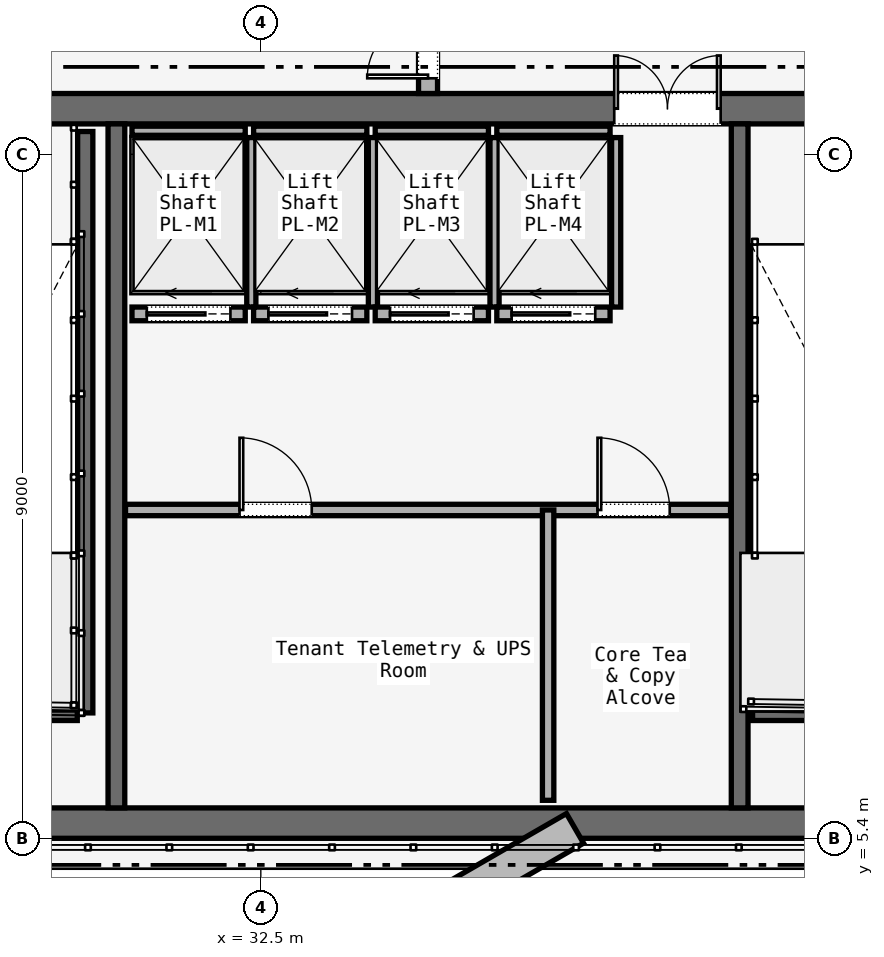
"""IFC4 building model, lengths in metres.
Left out: names, types, materials, properties, quantities, classifications, styles, units other than length and angle.
Written with IfcOpenShell. Run it as: python <this file> out.ifc"""

import sys

from ifc_helpers import new_model, si_unit, direction, frame, frame_2d, origin, place, context, subcontext, project, spatial, rectangle, extrude, element, fill, save


model = new_model("IFC4")
c1 = context("Model", 3, precision=1e-05, world=origin(), true_north=direction((0.0, 1.0)))
c2 = subcontext(c1, "Body", "Model", "MODEL_VIEW")
j1 = project(units=[si_unit("LENGTHUNIT", "METRE"), si_unit("PLANEANGLEUNIT", "RADIAN")], contexts=[c1])
p1 = place(None, origin())
s1 = spatial("IfcSite", under=j1, at=p1, CompositionType="ELEMENT")
p2 = place(p1, origin())
s2 = spatial("IfcBuilding", under=s1, at=p2, CompositionType="ELEMENT")
p3 = place(p2, frame((0.0, 0.0, 203.0)))
s3 = spatial("IfcBuildingStorey", under=s2, at=p3, CompositionType="ELEMENT", Elevation=203.0)
p4 = place(p3, frame((26.45, 15.0, 0.0), z_axis=(0.0, 0.0, 1.0), x_axis=(1.0, 0.0, 0.0)))
e1 = element("IfcWall", 1, at=p4, inside=s3, PredefinedType="SOLIDWALL", context=c2, shape_type="SweptSolid", body=[
    extrude(rectangle(XDim=31.1, YDim=0.4, at=frame_2d((15.55, 0.0))), origin(), (0.0, 0.0, 1.0), 5.12),
])
p5 = place(p4, frame((1.65, 0.0, 0.0)))
e2 = element("IfcOpeningElement", 2, at=p5, cuts=e1, PredefinedType="OPENING", context=c2, shape_type="SweptSolid", body=[
    extrude(rectangle(XDim=1.1, YDim=2.2, at=frame_2d((0.55, 1.1))), frame((0.0, 0.2, 0.0), z_axis=(0.0, -1.0, 0.0), x_axis=(1.0, 0.0, 0.0)), (0.0, 0.0, 1.0), 0.4),
])
p6 = place(p4, frame((13.65, 0.0, 0.0)))
e3 = element("IfcOpeningElement", 3, at=p6, cuts=e1, PredefinedType="OPENING", context=c2, shape_type="SweptSolid", body=[
    extrude(rectangle(XDim=1.1, YDim=2.2, at=frame_2d((0.55, 1.1))), frame((0.0, 0.2, 0.0), z_axis=(0.0, -1.0, 0.0), x_axis=(1.0, 0.0, 0.0)), (0.0, 0.0, 1.0), 0.4),
])
p7 = place(p4, frame((25.55, 0.0, 0.0)))
e4 = element("IfcOpeningElement", 4, at=p7, cuts=e1, PredefinedType="OPENING", context=c2, shape_type="SweptSolid", body=[
    extrude(rectangle(XDim=1.1, YDim=2.2, at=frame_2d((0.55, 1.1))), frame((0.0, 0.2, 0.0), z_axis=(0.0, -1.0, 0.0), x_axis=(1.0, 0.0, 0.0)), (0.0, 0.0, 1.0), 0.4),
])
p8 = place(p4, frame((10.7, 0.0, 0.0)))
e5 = element("IfcOpeningElement", 5, at=p8, cuts=e1, PredefinedType="OPENING", context=c2, shape_type="SweptSolid", body=[
    extrude(rectangle(XDim=1.4, YDim=2.2, at=frame_2d((0.7, 1.1))), frame((0.0, 0.2, 0.0), z_axis=(0.0, -1.0, 0.0), x_axis=(1.0, 0.0, 0.0)), (0.0, 0.0, 1.0), 0.4),
])
p9 = place(p4, frame((19.35, 0.0, 0.0)))
e6 = element("IfcOpeningElement", 6, at=p9, cuts=e1, PredefinedType="OPENING", context=c2, shape_type="SweptSolid", body=[
    extrude(rectangle(XDim=1.1, YDim=2.2, at=frame_2d((0.55, 1.1))), frame((0.0, 0.2, 0.0), z_axis=(0.0, -1.0, 0.0), x_axis=(1.0, 0.0, 0.0)), (0.0, 0.0, 1.0), 0.4),
])
p10 = place(p4, frame((21.4, 0.0, 0.0)))
e7 = element("IfcOpeningElement", 7, at=p10, cuts=e1, PredefinedType="OPENING", context=c2, shape_type="SweptSolid", body=[
    extrude(rectangle(XDim=0.9, YDim=2.1, at=frame_2d((0.45, 1.05))), frame((0.0, 0.2, 0.0), z_axis=(0.0, -1.0, 0.0), x_axis=(1.0, 0.0, 0.0)), (0.0, 0.0, 1.0), 0.4),
])
p11 = place(p4, frame((23.35, 0.0, 0.0)))
e8 = element("IfcOpeningElement", 8, at=p11, cuts=e1, PredefinedType="OPENING", context=c2, shape_type="SweptSolid", body=[
    extrude(rectangle(XDim=1.3, YDim=2.3, at=frame_2d((0.65, 1.15))), frame((0.0, 0.2, 0.0), z_axis=(0.0, -1.0, 0.0), x_axis=(1.0, 0.0, 0.0)), (0.0, 0.0, 1.0), 0.4),
])
p12 = place(p3, frame((26.45, 5.6, 0.0), z_axis=(0.0, 0.0, 1.0), x_axis=(1.0, 0.0, 0.0)))
e9 = element("IfcWall", 9, at=p12, inside=s3, PredefinedType="SOLIDWALL", context=c2, shape_type="SweptSolid", body=[
    extrude(rectangle(XDim=31.1, YDim=0.4, at=frame_2d((15.55, 0.0))), origin(), (0.0, 0.0, 1.0), 5.12),
])
for number, where, z_axis, x_axis in (
    (10, (30.6, 5.8, 0.0), (0.0, 0.0, 1.0), (0.0, 1.0, 0.0)),
    (11, (38.8, 5.8, 0.0), (0.0, 0.0, 1.0), (0.0, 1.0, 0.0)),
):
    element("IfcWall", number, at=place(p3, frame(where, z_axis=z_axis, x_axis=x_axis)), inside=s3, PredefinedType="SOLIDWALL", context=c2, shape_type="SweptSolid", body=[
        extrude(rectangle(XDim=9.0, YDim=0.22, at=frame_2d((4.5, 0.0))), origin(), (0.0, 0.0, 1.0), 5.12),
    ])
p13 = place(p3, frame((34.7, 15.2, 0.0), z_axis=(0.0, 0.0, 1.0), x_axis=(0.0, 1.0, 0.0)))
e12 = element("IfcWall", 12, at=p13, inside=s3, PredefinedType="SOLIDWALL", context=c2, shape_type="SweptSolid", body=[
    extrude(rectangle(XDim=19.8, YDim=0.25, at=frame_2d((9.9, 0.0))), origin(), (0.0, 0.0, 1.0), 3.99),
])
p14 = place(p13, frame((0.2, 0.0, 0.0)))
e13 = element("IfcOpeningElement", 13, at=p14, cuts=e12, PredefinedType="OPENING", context=c2, shape_type="SweptSolid", body=[
    extrude(rectangle(XDim=1.6, YDim=2.3, at=frame_2d((0.8, 1.15))), frame((0.0, 0.125, 0.0), z_axis=(0.0, -1.0, 0.0), x_axis=(1.0, 0.0, 0.0)), (0.0, 0.0, 1.0), 0.25),
])
p15 = place(p3, frame((30.19, 14.7, 0.0), z_axis=(0.0, 0.0, 1.0), x_axis=(0.0, -1.0, 0.0)))
e14 = element("IfcWall", 14, at=p15, inside=s3, PredefinedType="SOLIDWALL", context=c2, shape_type="SweptSolid", body=[
    extrude(rectangle(XDim=7.65, YDim=0.2, at=frame_2d((3.825, 0.0))), origin(), (0.0, 0.0, 1.0), 5.4),
])
for number, where, z_axis, x_axis in (
    (15, (26.97, 7.05, 0.0), (0.0, 0.0, 1.0), (1.0, 0.0, 0.0)),
    (16, (38.97, 7.05, 0.0), (0.0, 0.0, 1.0), (1.0, 0.0, 0.0)),
):
    element("IfcWall", number, at=place(p3, frame(where, z_axis=z_axis, x_axis=x_axis)), inside=s3, PredefinedType="SOLIDWALL", context=c2, shape_type="SweptSolid", body=[
        extrude(rectangle(XDim=3.115, YDim=0.2, at=frame_2d((1.558, 0.0))), origin(), (0.0, 0.0, 1.0), 5.4),
    ])
p16 = place(p3, frame((30.72, 9.72, 0.0), z_axis=(0.0, 0.0, 1.0), x_axis=(1.0, 0.0, 0.0)))
e17 = element("IfcWall", 17, at=p16, inside=s3, PredefinedType="PARTITIONING", context=c2, shape_type="SweptSolid", body=[
    extrude(rectangle(XDim=7.96, YDim=0.15, at=frame_2d((3.98, 0.0))), origin(), (0.0, 0.0, 1.0), 3.99),
])
p17 = place(p16, frame((1.5, 0.0, 0.0)))
e18 = element("IfcOpeningElement", 18, at=p17, cuts=e17, PredefinedType="OPENING", context=c2, shape_type="SweptSolid", body=[
    extrude(rectangle(XDim=0.95, YDim=2.2, at=frame_2d((0.475, 1.1))), frame((0.0, 0.075, 0.0), z_axis=(0.0, -1.0, 0.0), x_axis=(1.0, 0.0, 0.0)), (0.0, 0.0, 1.0), 0.15),
])
p18 = place(p16, frame((6.21, 0.0, 0.0)))
e19 = element("IfcOpeningElement", 19, at=p18, cuts=e17, PredefinedType="OPENING", context=c2, shape_type="SweptSolid", body=[
    extrude(rectangle(XDim=0.95, YDim=2.2, at=frame_2d((0.475, 1.1))), frame((0.0, 0.075, 0.0), z_axis=(0.0, -1.0, 0.0), x_axis=(1.0, 0.0, 0.0)), (0.0, 0.0, 1.0), 0.15),
])
p19 = place(p3, frame((36.28, 5.9, 0.0), z_axis=(0.0, 0.0, 1.0), x_axis=(0.0, 1.0, 0.0)))
e20 = element("IfcWall", 20, at=p19, inside=s3, PredefinedType="PARTITIONING", context=c2, shape_type="SweptSolid", body=[
    extrude(rectangle(XDim=3.82, YDim=0.15, at=frame_2d((1.91, 0.0))), origin(), (0.0, 0.0, 1.0), 3.99),
])
p20 = place(p3, frame((30.805, 12.3, 0.0), z_axis=(0.0, 0.0, 1.0), x_axis=(1.0, 0.0, 0.0)))
e21 = element("IfcWall", 21, at=p20, inside=s3, PredefinedType="SOLIDWALL", context=c2, shape_type="SweptSolid", body=[
    extrude(rectangle(XDim=1.49, YDim=0.18, at=frame_2d((0.745, 0.0))), origin(), (0.0, 0.0, 1.0), 3.99),
])
p21 = place(p20, frame((0.195, 0.0, 0.0)))
e22 = element("IfcOpeningElement", 22, at=p21, cuts=e21, PredefinedType="OPENING", context=c2, shape_type="SweptSolid", body=[
    extrude(rectangle(XDim=1.1, YDim=2.2, at=frame_2d((0.55, 1.1))), frame((0.0, 0.09, 0.0), z_axis=(0.0, -1.0, 0.0), x_axis=(1.0, 0.0, 0.0)), (0.0, 0.0, 1.0), 0.18),
])
p22 = place(p3, frame((30.805, 14.71, 0.0), z_axis=(0.0, 0.0, 1.0), x_axis=(1.0, 0.0, 0.0)))
e23 = element("IfcWall", 23, at=p22, inside=s3, PredefinedType="SOLIDWALL", context=c2, shape_type="SweptSolid", body=[
    extrude(rectangle(XDim=1.49, YDim=0.12, at=frame_2d((0.745, 0.0))), origin(), (0.0, 0.0, 1.0), 3.99),
])
p23 = place(p3, frame((32.375, 12.39, 0.0), z_axis=(0.0, 0.0, 1.0), x_axis=(0.0, 1.0, 0.0)))
e24 = element("IfcWall", 24, at=p23, inside=s3, PredefinedType="SOLIDWALL", context=c2, shape_type="SweptSolid", body=[
    extrude(rectangle(XDim=2.23, YDim=0.12, at=frame_2d((1.115, 0.0))), origin(), (0.0, 0.0, 1.0), 3.99),
])
p24 = place(p3, frame((32.405, 12.3, 0.0), z_axis=(0.0, 0.0, 1.0), x_axis=(1.0, 0.0, 0.0)))
e25 = element("IfcWall", 25, at=p24, inside=s3, PredefinedType="SOLIDWALL", context=c2, shape_type="SweptSolid", body=[
    extrude(rectangle(XDim=1.49, YDim=0.18, at=frame_2d((0.745, 0.0))), origin(), (0.0, 0.0, 1.0), 3.99),
])
p25 = place(p24, frame((0.195, 0.0, 0.0)))
e26 = element("IfcOpeningElement", 26, at=p25, cuts=e25, PredefinedType="OPENING", context=c2, shape_type="SweptSolid", body=[
    extrude(rectangle(XDim=1.1, YDim=2.2, at=frame_2d((0.55, 1.1))), frame((0.0, 0.09, 0.0), z_axis=(0.0, -1.0, 0.0), x_axis=(1.0, 0.0, 0.0)), (0.0, 0.0, 1.0), 0.18),
])
p26 = place(p3, frame((32.405, 14.71, 0.0), z_axis=(0.0, 0.0, 1.0), x_axis=(1.0, 0.0, 0.0)))
e27 = element("IfcWall", 27, at=p26, inside=s3, PredefinedType="SOLIDWALL", context=c2, shape_type="SweptSolid", body=[
    extrude(rectangle(XDim=1.49, YDim=0.12, at=frame_2d((0.745, 0.0))), origin(), (0.0, 0.0, 1.0), 3.99),
])
p27 = place(p3, frame((33.975, 12.39, 0.0), z_axis=(0.0, 0.0, 1.0), x_axis=(0.0, 1.0, 0.0)))
e28 = element("IfcWall", 28, at=p27, inside=s3, PredefinedType="SOLIDWALL", context=c2, shape_type="SweptSolid", body=[
    extrude(rectangle(XDim=2.23, YDim=0.12, at=frame_2d((1.115, 0.0))), origin(), (0.0, 0.0, 1.0), 3.99),
])
p28 = place(p3, frame((34.005, 12.3, 0.0), z_axis=(0.0, 0.0, 1.0), x_axis=(1.0, 0.0, 0.0)))
e29 = element("IfcWall", 29, at=p28, inside=s3, PredefinedType="SOLIDWALL", context=c2, shape_type="SweptSolid", body=[
    extrude(rectangle(XDim=1.49, YDim=0.18, at=frame_2d((0.745, 0.0))), origin(), (0.0, 0.0, 1.0), 3.99),
])
p29 = place(p28, frame((0.195, 0.0, 0.0)))
e30 = element("IfcOpeningElement", 30, at=p29, cuts=e29, PredefinedType="OPENING", context=c2, shape_type="SweptSolid", body=[
    extrude(rectangle(XDim=1.1, YDim=2.2, at=frame_2d((0.55, 1.1))), frame((0.0, 0.09, 0.0), z_axis=(0.0, -1.0, 0.0), x_axis=(1.0, 0.0, 0.0)), (0.0, 0.0, 1.0), 0.18),
])
p30 = place(p3, frame((34.005, 14.71, 0.0), z_axis=(0.0, 0.0, 1.0), x_axis=(1.0, 0.0, 0.0)))
e31 = element("IfcWall", 31, at=p30, inside=s3, PredefinedType="SOLIDWALL", context=c2, shape_type="SweptSolid", body=[
    extrude(rectangle(XDim=1.49, YDim=0.12, at=frame_2d((0.745, 0.0))), origin(), (0.0, 0.0, 1.0), 3.99),
])
p31 = place(p3, frame((35.575, 12.39, 0.0), z_axis=(0.0, 0.0, 1.0), x_axis=(0.0, 1.0, 0.0)))
e32 = element("IfcWall", 32, at=p31, inside=s3, PredefinedType="SOLIDWALL", context=c2, shape_type="SweptSolid", body=[
    extrude(rectangle(XDim=2.23, YDim=0.12, at=frame_2d((1.115, 0.0))), origin(), (0.0, 0.0, 1.0), 3.99),
])
p32 = place(p3, frame((35.605, 12.3, 0.0), z_axis=(0.0, 0.0, 1.0), x_axis=(1.0, 0.0, 0.0)))
e33 = element("IfcWall", 33, at=p32, inside=s3, PredefinedType="SOLIDWALL", context=c2, shape_type="SweptSolid", body=[
    extrude(rectangle(XDim=1.49, YDim=0.18, at=frame_2d((0.745, 0.0))), origin(), (0.0, 0.0, 1.0), 3.99),
])
p33 = place(p32, frame((0.195, 0.0, 0.0)))
e34 = element("IfcOpeningElement", 34, at=p33, cuts=e33, PredefinedType="OPENING", context=c2, shape_type="SweptSolid", body=[
    extrude(rectangle(XDim=1.1, YDim=2.2, at=frame_2d((0.55, 1.1))), frame((0.0, 0.09, 0.0), z_axis=(0.0, -1.0, 0.0), x_axis=(1.0, 0.0, 0.0)), (0.0, 0.0, 1.0), 0.18),
])
p34 = place(p3, frame((35.605, 14.71, 0.0), z_axis=(0.0, 0.0, 1.0), x_axis=(1.0, 0.0, 0.0)))
e35 = element("IfcWall", 35, at=p34, inside=s3, PredefinedType="SOLIDWALL", context=c2, shape_type="SweptSolid", body=[
    extrude(rectangle(XDim=1.49, YDim=0.12, at=frame_2d((0.745, 0.0))), origin(), (0.0, 0.0, 1.0), 3.99),
])
p35 = place(p3, frame((37.175, 12.39, 0.0), z_axis=(0.0, 0.0, 1.0), x_axis=(0.0, 1.0, 0.0)))
e36 = element("IfcWall", 36, at=p35, inside=s3, PredefinedType="SOLIDWALL", context=c2, shape_type="SweptSolid", body=[
    extrude(rectangle(XDim=2.23, YDim=0.12, at=frame_2d((1.115, 0.0))), origin(), (0.0, 0.0, 1.0), 3.99),
])
p36 = place(p14, origin())
e37 = element("IfcDoor", 37, at=p36, inside=s3, OperationType="DOUBLE_DOOR_SINGLE_SWING", PredefinedType="DOOR", context=c2, shape_type="SweptSolid", body=[
    extrude(rectangle(XDim=1.6, YDim=2.3, at=frame_2d((0.8, 1.15))), frame((0.0, 0.025, 0.0), z_axis=(0.0, -1.0, 0.0), x_axis=(1.0, 0.0, 0.0)), (0.0, 0.0, 1.0), 0.05),
])
fill(e13, e37)
p37 = place(p8, origin())
e38 = element("IfcDoor", 38, at=p37, inside=s3, OperationType="DOUBLE_DOOR_SINGLE_SWING", PredefinedType="DOOR", context=c2, shape_type="SweptSolid", body=[
    extrude(rectangle(XDim=1.4, YDim=2.2, at=frame_2d((0.7, 1.1))), frame((0.0, 0.025, 0.0), z_axis=(0.0, -1.0, 0.0), x_axis=(1.0, 0.0, 0.0)), (0.0, 0.0, 1.0), 0.05),
])
fill(e5, e38)
p38 = place(p17, origin())
e39 = element("IfcDoor", 39, at=p38, inside=s3, OperationType="SINGLE_SWING_LEFT", PredefinedType="DOOR", context=c2, shape_type="SweptSolid", body=[
    extrude(rectangle(XDim=0.95, YDim=2.2, at=frame_2d((0.475, 1.1))), frame((0.0, 0.025, 0.0), z_axis=(0.0, -1.0, 0.0), x_axis=(1.0, 0.0, 0.0)), (0.0, 0.0, 1.0), 0.05),
])
fill(e18, e39)
p39 = place(p18, origin())
e40 = element("IfcDoor", 40, at=p39, inside=s3, OperationType="SINGLE_SWING_RIGHT", PredefinedType="DOOR", context=c2, shape_type="SweptSolid", body=[
    extrude(rectangle(XDim=0.95, YDim=2.2, at=frame_2d((0.475, 1.1))), frame((0.0, 0.025, 0.0), z_axis=(0.0, -1.0, 0.0), x_axis=(1.0, 0.0, 0.0)), (0.0, 0.0, 1.0), 0.05),
])
fill(e19, e40)
p40 = place(p21, origin())
e41 = element("IfcDoor", 41, at=p40, inside=s3, OperationType="SLIDING_TO_LEFT", PredefinedType="DOOR", context=c2, shape_type="SweptSolid", body=[
    extrude(rectangle(XDim=1.1, YDim=2.2, at=frame_2d((0.55, 1.1))), frame((0.0, 0.025, 0.0), z_axis=(0.0, -1.0, 0.0), x_axis=(1.0, 0.0, 0.0)), (0.0, 0.0, 1.0), 0.05),
])
fill(e22, e41)
p41 = place(p25, origin())
e42 = element("IfcDoor", 42, at=p41, inside=s3, OperationType="SLIDING_TO_LEFT", PredefinedType="DOOR", context=c2, shape_type="SweptSolid", body=[
    extrude(rectangle(XDim=1.1, YDim=2.2, at=frame_2d((0.55, 1.1))), frame((0.0, 0.025, 0.0), z_axis=(0.0, -1.0, 0.0), x_axis=(1.0, 0.0, 0.0)), (0.0, 0.0, 1.0), 0.05),
])
fill(e26, e42)
p42 = place(p29, origin())
e43 = element("IfcDoor", 43, at=p42, inside=s3, OperationType="SLIDING_TO_LEFT", PredefinedType="DOOR", context=c2, shape_type="SweptSolid", body=[
    extrude(rectangle(XDim=1.1, YDim=2.2, at=frame_2d((0.55, 1.1))), frame((0.0, 0.025, 0.0), z_axis=(0.0, -1.0, 0.0), x_axis=(1.0, 0.0, 0.0)), (0.0, 0.0, 1.0), 0.05),
])
fill(e30, e43)
p43 = place(p33, origin())
e44 = element("IfcDoor", 44, at=p43, inside=s3, OperationType="SLIDING_TO_LEFT", PredefinedType="DOOR", context=c2, shape_type="SweptSolid", body=[
    extrude(rectangle(XDim=1.1, YDim=2.2, at=frame_2d((0.55, 1.1))), frame((0.0, 0.025, 0.0), z_axis=(0.0, -1.0, 0.0), x_axis=(1.0, 0.0, 0.0)), (0.0, 0.0, 1.0), 0.05),
])
fill(e34, e44)
save(model, sys.argv[1])
